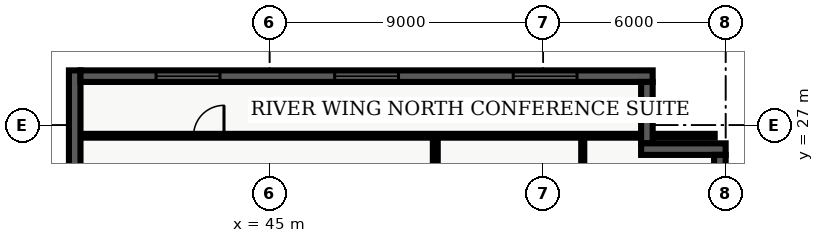
"""IFC4 building model, lengths in metres.
Left out: names, types, materials, properties, quantities, classifications, styles, units other than length and angle.
Written with IfcOpenShell. Run it as: python <this file> out.ifc"""

import sys

from ifc_helpers import new_model, entity, si_unit, converted_unit, direction, frame, origin_with_axes, origin_2d_with_axis, place, context, subcontext, project, spatial, polyline, rectangle, outline, extrude, element, fill, save


model = new_model("IFC4")
c1 = context("Model", 3, precision=1e-05, world=origin_with_axes(), true_north=direction((0.0, 1.0)))
c2 = subcontext(c1, "Body", "Model", "MODEL_VIEW")
j1 = project(units=[si_unit("LENGTHUNIT", "METRE"), converted_unit("PLANEANGLEUNIT", "DEGREE", entity("IfcPlaneAngleMeasure", 0.017), si_unit("PLANEANGLEUNIT", "RADIAN"), dimensions=[0, 0, 0, 0, 0, 0, 0])], contexts=[c1])
p1 = place(None, origin_with_axes())
s1 = spatial("IfcSite", under=j1, at=p1, CompositionType="ELEMENT")
p2 = place(p1, origin_with_axes())
s2 = spatial("IfcBuilding", under=s1, at=p2, CompositionType="ELEMENT")
p3 = place(p2, frame((0.0, 0.0, 32.7), z_axis=(0.0, 0.0, 1.0), x_axis=(1.0, 0.0, 0.0)))
s3 = spatial("IfcBuildingStorey", under=s2, at=p3, CompositionType="ELEMENT", Elevation=32.7)
p4 = place(p3, frame((50.45, 7.85, 0.0), z_axis=(0.0, 0.0, 1.0), x_axis=(0.0, 1.0, 0.0)))
e1 = element("IfcWall", 1, at=p4, inside=s3, PredefinedType="PARTITIONING", context=c2, shape_type="SweptSolid", body=[
    extrude(outline(polyline([(0.0, -0.08), (18.8, -0.08), (18.8, 0.08), (0.0, 0.08), (0.0, -0.08)])), origin_with_axes(), (0.0, 0.0, 1.0), 2.7),
])
p5 = place(p4, frame((4.473, 0.0, 0.0), z_axis=(0.0, 0.0, 1.0), x_axis=(1.0, 0.0, 0.0)))
e2 = element("IfcOpeningElement", 2, at=p5, cuts=e1, PredefinedType="OPENING", context=c2, shape_type="SweptSolid", body=[
    extrude(rectangle(XDim=1.0, YDim=0.18, at=origin_2d_with_axis()), origin_with_axes(), (0.0, 0.0, 1.0), 2.15),
])
p6 = place(p4, frame((7.597, 0.0, 0.0), z_axis=(0.0, 0.0, 1.0), x_axis=(1.0, 0.0, 0.0)))
e3 = element("IfcOpeningElement", 3, at=p6, cuts=e1, PredefinedType="OPENING", context=c2, shape_type="SweptSolid", body=[
    extrude(rectangle(XDim=1.0, YDim=0.18, at=origin_2d_with_axis()), origin_with_axes(), (0.0, 0.0, 1.0), 2.15),
])
p7 = place(p4, frame((14.075, 0.0, 0.0), z_axis=(0.0, 0.0, 1.0), x_axis=(1.0, 0.0, 0.0)))
e4 = element("IfcOpeningElement", 4, at=p7, cuts=e1, PredefinedType="OPENING", context=c2, shape_type="SweptSolid", body=[
    extrude(rectangle(XDim=1.0, YDim=0.18, at=origin_2d_with_axis()), origin_with_axes(), (0.0, 0.0, 1.0), 2.15),
])
p8 = place(p3, frame((38.76, 26.65, 0.0), z_axis=(0.0, 0.0, 1.0), x_axis=(1.0, 0.0, 0.0)))
e5 = element("IfcWall", 5, at=p8, inside=s3, PredefinedType="PARTITIONING", context=c2, shape_type="SweptSolid", body=[
    extrude(outline(polyline([(0.0, -0.062), (20.88, -0.062), (20.88, 0.062), (0.0, 0.062), (0.0, -0.062)])), origin_with_axes(), (0.0, 0.0, 1.0), 2.7),
])
p9 = place(p8, frame((4.24, 0.0, 0.0), z_axis=(0.0, 0.0, 1.0), x_axis=(1.0, 0.0, 0.0)))
e6 = element("IfcOpeningElement", 6, at=p9, cuts=e5, PredefinedType="OPENING", context=c2, shape_type="SweptSolid", body=[
    extrude(rectangle(XDim=1.0, YDim=0.145, at=origin_2d_with_axis()), origin_with_axes(), (0.0, 0.0, 1.0), 2.15),
])
p10 = place(p3, frame((55.3, 7.98, 0.0), z_axis=(0.0, 0.0, 1.0), x_axis=(0.0, 1.0, 0.0)))
e7 = element("IfcWall", 7, at=p10, inside=s3, PredefinedType="PARTITIONING", context=c2, shape_type="SweptSolid", body=[
    extrude(outline(polyline([(0.0, -0.05), (18.54, -0.05), (18.54, 0.05), (0.0, 0.05), (0.0, -0.05)])), origin_with_axes(), (0.0, 0.0, 1.0), 2.7),
])
p11 = place(p10, frame((2.471, 0.0, 0.0), z_axis=(0.0, 0.0, 1.0), x_axis=(1.0, 0.0, 0.0)))
e8 = element("IfcOpeningElement", 8, at=p11, cuts=e7, PredefinedType="OPENING", context=c2, shape_type="SweptSolid", body=[
    extrude(rectangle(XDim=0.95, YDim=0.12, at=origin_2d_with_axis()), origin_with_axes(), (0.0, 0.0, 1.0), 2.15),
])
p12 = place(p10, frame((8.027, 0.0, 0.0), z_axis=(0.0, 0.0, 1.0), x_axis=(1.0, 0.0, 0.0)))
e9 = element("IfcOpeningElement", 9, at=p12, cuts=e7, PredefinedType="OPENING", context=c2, shape_type="SweptSolid", body=[
    extrude(rectangle(XDim=0.95, YDim=0.12, at=origin_2d_with_axis()), origin_with_axes(), (0.0, 0.0, 1.0), 2.15),
])
p13 = place(p10, frame((14.825, 0.0, 0.0), z_axis=(0.0, 0.0, 1.0), x_axis=(1.0, 0.0, 0.0)))
e10 = element("IfcOpeningElement", 10, at=p13, cuts=e7, PredefinedType="OPENING", context=c2, shape_type="SweptSolid", body=[
    extrude(rectangle(XDim=0.95, YDim=0.12, at=origin_2d_with_axis()), origin_with_axes(), (0.0, 0.0, 1.0), 2.15),
])
p14 = place(p3, frame((38.59, 21.22, 0.0), z_axis=(0.0, 0.0, 1.0), x_axis=(0.0, 1.0, 0.0)))
e11 = element("IfcWall", 11, at=p14, inside=s3, PredefinedType="SOLIDWALL", context=c2, shape_type="SweptSolid", body=[
    extrude(outline(polyline([(0.0, -0.19), (7.58, -0.19), (7.58, 0.19), (0.0, 0.19), (0.0, -0.19)])), origin_with_axes(), (0.0, 0.0, 1.0), 3.66),
])
p15 = place(p3, frame((38.78, 28.61, 0.0), z_axis=(0.0, 0.0, 1.0), x_axis=(1.0, 0.0, 0.0)))
e12 = element("IfcWall", 12, at=p15, inside=s3, PredefinedType="SOLIDWALL", context=c2, shape_type="SweptSolid", body=[
    extrude(outline(polyline([(0.0, -0.19), (18.82, -0.19), (18.82, 0.19), (0.0, 0.19), (0.0, -0.19)])), origin_with_axes(), (0.0, 0.0, 1.0), 3.66),
])
p16 = place(p15, frame((3.537, 0.0, 0.45), z_axis=(0.0, 0.0, 1.0), x_axis=(1.0, 0.0, 0.0)))
e13 = element("IfcOpeningElement", 13, at=p16, cuts=e12, PredefinedType="OPENING", context=c2, shape_type="SweptSolid", body=[
    extrude(rectangle(XDim=2.1, YDim=0.4, at=origin_2d_with_axis()), origin_with_axes(), (0.0, 0.0, 1.0), 2.2),
])
p17 = place(p15, frame((9.41, 0.0, 0.45), z_axis=(0.0, 0.0, 1.0), x_axis=(1.0, 0.0, 0.0)))
e14 = element("IfcOpeningElement", 14, at=p17, cuts=e12, PredefinedType="OPENING", context=c2, shape_type="SweptSolid", body=[
    extrude(rectangle(XDim=2.1, YDim=0.4, at=origin_2d_with_axis()), origin_with_axes(), (0.0, 0.0, 1.0), 2.2),
])
p18 = place(p15, frame((15.283, 0.0, 0.45), z_axis=(0.0, 0.0, 1.0), x_axis=(1.0, 0.0, 0.0)))
e15 = element("IfcOpeningElement", 15, at=p18, cuts=e12, PredefinedType="OPENING", context=c2, shape_type="SweptSolid", body=[
    extrude(rectangle(XDim=2.1, YDim=0.4, at=origin_2d_with_axis()), origin_with_axes(), (0.0, 0.0, 1.0), 2.2),
])
p19 = place(p3, frame((57.41, 28.42, 0.0), z_axis=(0.0, 0.0, 1.0), x_axis=(0.0, -1.0, 0.0)))
e16 = element("IfcWall", 16, at=p19, inside=s3, PredefinedType="SOLIDWALL", context=c2, shape_type="SweptSolid", body=[
    extrude(outline(polyline([(0.0, -0.19), (2.02, -0.19), (2.02, 0.19), (0.0, 0.19), (0.0, -0.19)])), origin_with_axes(), (0.0, 0.0, 1.0), 3.66),
])
p20 = place(p3, frame((57.22, 26.21, 0.0), z_axis=(0.0, 0.0, 1.0), x_axis=(1.0, 0.0, 0.0)))
e17 = element("IfcWall", 17, at=p20, inside=s3, PredefinedType="SOLIDWALL", context=c2, shape_type="SweptSolid", body=[
    extrude(outline(polyline([(0.0, -0.19), (2.78, -0.19), (2.78, 0.19), (0.0, 0.19), (0.0, -0.19)])), origin_with_axes(), (0.0, 0.0, 1.0), 3.66),
])
p21 = place(p3, frame((59.81, 26.02, 0.0), z_axis=(0.0, 0.0, 1.0), x_axis=(0.0, -1.0, 0.0)))
e18 = element("IfcWall", 18, at=p21, inside=s3, PredefinedType="SOLIDWALL", context=c2, shape_type="SweptSolid", body=[
    extrude(outline(polyline([(0.0, -0.19), (23.62, -0.19), (23.62, 0.19), (0.0, 0.19), (0.0, -0.19)])), origin_with_axes(), (0.0, 0.0, 1.0), 3.66),
])
p22 = place(p21, frame((3.853, 0.0, 0.45), z_axis=(0.0, 0.0, 1.0), x_axis=(1.0, 0.0, 0.0)))
e19 = element("IfcOpeningElement", 19, at=p22, cuts=e18, PredefinedType="OPENING", context=c2, shape_type="SweptSolid", body=[
    extrude(rectangle(XDim=2.1, YDim=0.4, at=origin_2d_with_axis()), origin_with_axes(), (0.0, 0.0, 1.0), 2.2),
])
p23 = place(p21, frame((20.218, 0.0, 0.45), z_axis=(0.0, 0.0, 1.0), x_axis=(1.0, 0.0, 0.0)))
e20 = element("IfcOpeningElement", 20, at=p23, cuts=e18, PredefinedType="OPENING", context=c2, shape_type="SweptSolid", body=[
    extrude(rectangle(XDim=2.1, YDim=0.4, at=origin_2d_with_axis()), origin_with_axes(), (0.0, 0.0, 1.0), 2.2),
])
p24 = place(p8, frame((4.24, 0.0, 0.0), z_axis=(0.0, 0.0, 1.0), x_axis=(1.0, 0.0, 0.0)))
e21 = element("IfcDoor", 21, at=p24, inside=s3, OperationType="SINGLE_SWING_RIGHT", PredefinedType="DOOR", context=c2, shape_type="SweptSolid", body=[
    extrude(rectangle(XDim=1.0, YDim=0.075, at=origin_2d_with_axis()), origin_with_axes(), (0.0, 0.0, 1.0), 2.15),
])
fill(e6, e21)
p25 = place(p15, frame((3.537, 0.0, 0.45), z_axis=(0.0, 0.0, 1.0), x_axis=(1.0, 0.0, 0.0)))
e22 = element("IfcWindow", 22, at=p25, inside=s3, PredefinedType="WINDOW", context=c2, shape_type="SweptSolid", body=[
    extrude(rectangle(XDim=2.1, YDim=0.09, at=origin_2d_with_axis()), origin_with_axes(), (0.0, 0.0, 1.0), 2.2),
])
fill(e13, e22)
p26 = place(p15, frame((9.41, 0.0, 0.45), z_axis=(0.0, 0.0, 1.0), x_axis=(1.0, 0.0, 0.0)))
e23 = element("IfcWindow", 23, at=p26, inside=s3, PredefinedType="WINDOW", context=c2, shape_type="SweptSolid", body=[
    extrude(rectangle(XDim=2.1, YDim=0.09, at=origin_2d_with_axis()), origin_with_axes(), (0.0, 0.0, 1.0), 2.2),
])
fill(e14, e23)
p27 = place(p15, frame((15.283, 0.0, 0.45), z_axis=(0.0, 0.0, 1.0), x_axis=(1.0, 0.0, 0.0)))
e24 = element("IfcWindow", 24, at=p27, inside=s3, PredefinedType="WINDOW", context=c2, shape_type="SweptSolid", body=[
    extrude(rectangle(XDim=2.1, YDim=0.09, at=origin_2d_with_axis()), origin_with_axes(), (0.0, 0.0, 1.0), 2.2),
])
fill(e15, e24)
save(model, sys.argv[1])
